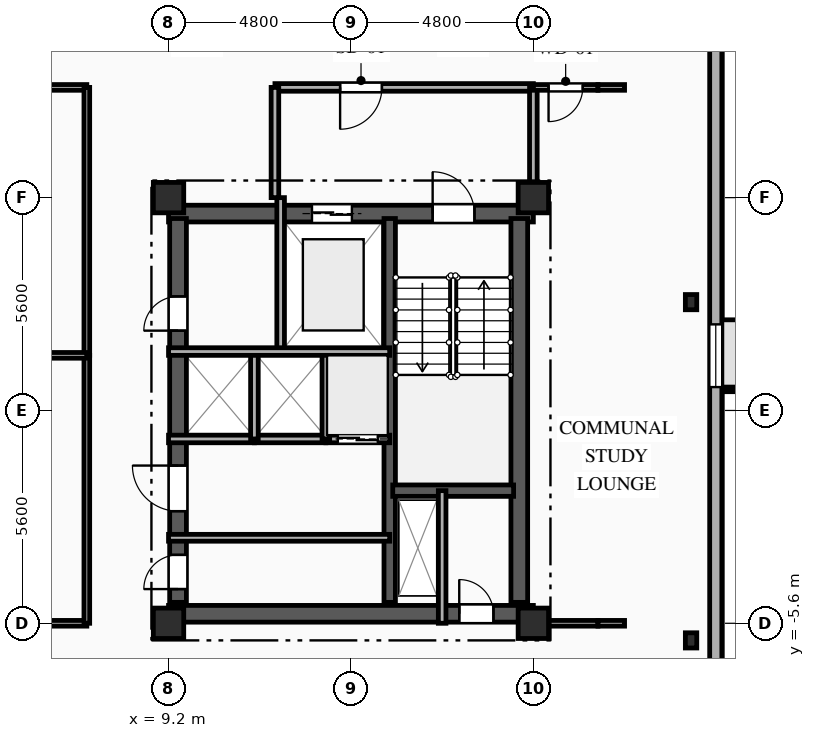
"""IFC4 building model, lengths in metres.
Left out: names, types, materials, properties, quantities, classifications, styles, units other than length and angle.
Written with IfcOpenShell. Run it as: python <this file> out.ifc"""

import sys

from ifc_helpers import new_model, si_unit, direction, frame, frame_2d, origin, origin_2d, place, context, subcontext, project, spatial, rectangle, i_section, extrude, element, fill, save


model = new_model("IFC4")
c1 = context("Model", 3, precision=1e-05, world=origin(), true_north=direction((0.0, 1.0)))
c2 = subcontext(c1, "Body", "Model", "MODEL_VIEW")
j1 = project(units=[si_unit("LENGTHUNIT", "METRE"), si_unit("PLANEANGLEUNIT", "RADIAN")], contexts=[c1])
p1 = place(None, origin())
s1 = spatial("IfcSite", under=j1, at=p1, CompositionType="ELEMENT")
p2 = place(p1, origin())
s2 = spatial("IfcBuilding", under=s1, at=p2, CompositionType="ELEMENT")
p3 = place(p2, frame((0.0, 0.0, 251.75)))
s3 = spatial("IfcBuildingStorey", under=s2, at=p3, CompositionType="ELEMENT", Elevation=251.75)
for number, where, z_axis, x_axis in (
    (1, (9.2, -5.6, 0.0), (0.0, 0.0, 1.0), (1.0, 0.0, 0.0)),
    (2, (9.2, 5.6, 0.0), (0.0, 0.0, 1.0), (1.0, 0.0, 0.0)),
    (3, (18.8, -5.6, 0.0), (0.0, 0.0, 1.0), (1.0, 0.0, 0.0)),
    (4, (18.8, 5.6, 0.0), (0.0, 0.0, 1.0), (1.0, 0.0, 0.0)),
):
    element("IfcColumn", number, at=place(p3, frame(where, z_axis=z_axis, x_axis=x_axis)), inside=s3, PredefinedType="COLUMN", context=c2, shape_type="SweptSolid", body=[
        extrude(rectangle(XDim=0.8, YDim=0.8, at=origin_2d()), origin(), (0.0, 0.0, 1.0), 3.35),
    ])
for number, where, z_axis, x_axis in (
    (5, (22.95, -6.05, 0.0), (0.0, 0.0, 1.0), (1.0, 0.0, 0.0)),
    (6, (22.95, 2.85, 0.0), (0.0, 0.0, 1.0), (1.0, 0.0, 0.0)),
):
    element("IfcColumn", number, at=place(p3, frame(where, z_axis=z_axis, x_axis=x_axis)), inside=s3, PredefinedType="COLUMN", context=c2, shape_type="SweptSolid", body=[
        extrude(i_section(OverallWidth=0.3, OverallDepth=0.4, WebThickness=0.013, FlangeThickness=0.024, FilletRadius=0.027, at=origin_2d()), origin(), (0.0, 0.0, 1.0), 3.35),
    ])
p4 = place(p3, frame((23.6, 12.4, 0.0), z_axis=(0.0, 0.0, 1.0), x_axis=(0.0, -1.0, 0.0)))
e7 = element("IfcWall", 7, at=p4, inside=s3, PredefinedType="SOLIDWALL", context=c2, shape_type="SweptSolid", body=[
    extrude(rectangle(XDim=28.0, YDim=0.32, at=frame_2d((14.0, 0.0))), origin(), (0.0, 0.0, 1.0), 3.04),
])
p5 = place(p4, frame((10.135, 0.0, 0.85)))
e8 = element("IfcOpeningElement", 8, at=p5, cuts=e7, PredefinedType="OPENING", context=c2, shape_type="SweptSolid", body=[
    extrude(rectangle(XDim=1.65, YDim=1.85, at=frame_2d((0.825, 0.925))), frame((0.0, 0.17, 0.0), z_axis=(0.0, -1.0, 0.0), x_axis=(1.0, 0.0, 0.0)), (0.0, 0.0, 1.0), 0.34),
])
p6 = place(p3, frame((9.2, 5.18, 0.0), z_axis=(0.0, 0.0, 1.0), x_axis=(1.0, 0.0, 0.0)))
e9 = element("IfcWall", 9, at=p6, inside=s3, PredefinedType="SHEAR", context=c2, shape_type="SweptSolid", body=[
    extrude(rectangle(XDim=9.6, YDim=0.44, at=frame_2d((4.8, 0.0))), origin(), (0.0, 0.0, 1.0), 3.04),
])
p7 = place(p6, frame((6.95, 0.0, 0.0)))
e10 = element("IfcOpeningElement", 10, at=p7, cuts=e9, PredefinedType="OPENING", context=c2, shape_type="SweptSolid", body=[
    extrude(rectangle(XDim=1.1, YDim=2.15, at=frame_2d((0.55, 1.075))), frame((0.0, 0.23, 0.0), z_axis=(0.0, -1.0, 0.0), x_axis=(1.0, 0.0, 0.0)), (0.0, 0.0, 1.0), 0.46),
])
p8 = place(p6, frame((3.775, 0.0, 0.0)))
e11 = element("IfcOpeningElement", 11, at=p8, cuts=e9, PredefinedType="OPENING", context=c2, shape_type="SweptSolid", body=[
    extrude(rectangle(XDim=1.05, YDim=2.1, at=frame_2d((0.525, 1.05))), frame((0.0, 0.23, 0.0), z_axis=(0.0, -1.0, 0.0), x_axis=(1.0, 0.0, 0.0)), (0.0, 0.0, 1.0), 0.46),
])
p9 = place(p3, frame((9.2, -5.35, 0.0), z_axis=(0.0, 0.0, 1.0), x_axis=(1.0, 0.0, 0.0)))
e12 = element("IfcWall", 12, at=p9, inside=s3, PredefinedType="SHEAR", context=c2, shape_type="SweptSolid", body=[
    extrude(rectangle(XDim=9.6, YDim=0.44, at=frame_2d((4.8, 0.0))), origin(), (0.0, 0.0, 1.0), 3.04),
])
p10 = place(p9, frame((7.65, 0.0, 0.0)))
e13 = element("IfcOpeningElement", 13, at=p10, cuts=e12, PredefinedType="OPENING", context=c2, shape_type="SweptSolid", body=[
    extrude(rectangle(XDim=0.9, YDim=2.1, at=frame_2d((0.45, 1.05))), frame((0.0, 0.23, 0.0), z_axis=(0.0, -1.0, 0.0), x_axis=(1.0, 0.0, 0.0)), (0.0, 0.0, 1.0), 0.46),
])
p11 = place(p3, frame((9.45, -5.05, 0.0), z_axis=(0.0, 0.0, 1.0), x_axis=(0.0, 1.0, 0.0)))
e14 = element("IfcWall", 14, at=p11, inside=s3, PredefinedType="SHEAR", context=c2, shape_type="SweptSolid", body=[
    extrude(rectangle(XDim=10.1, YDim=0.44, at=frame_2d((5.05, 0.0))), origin(), (0.0, 0.0, 1.0), 3.04),
])
p12 = place(p11, frame((7.15, 0.0, 0.0)))
e15 = element("IfcOpeningElement", 15, at=p12, cuts=e14, PredefinedType="OPENING", context=c2, shape_type="SweptSolid", body=[
    extrude(rectangle(XDim=0.9, YDim=2.1, at=frame_2d((0.45, 1.05))), frame((0.0, 0.23, 0.0), z_axis=(0.0, -1.0, 0.0), x_axis=(1.0, 0.0, 0.0)), (0.0, 0.0, 1.0), 0.46),
])
p13 = place(p11, frame((2.4, 0.0, 0.0)))
e16 = element("IfcOpeningElement", 16, at=p13, cuts=e14, PredefinedType="OPENING", context=c2, shape_type="SweptSolid", body=[
    extrude(rectangle(XDim=1.2, YDim=2.15, at=frame_2d((0.6, 1.075))), frame((0.0, 0.23, 0.0), z_axis=(0.0, -1.0, 0.0), x_axis=(1.0, 0.0, 0.0)), (0.0, 0.0, 1.0), 0.46),
])
p14 = place(p11, frame((0.35, 0.0, 0.0)))
e17 = element("IfcOpeningElement", 17, at=p14, cuts=e14, PredefinedType="OPENING", context=c2, shape_type="SweptSolid", body=[
    extrude(rectangle(XDim=0.9, YDim=2.1, at=frame_2d((0.45, 1.05))), frame((0.0, 0.23, 0.0), z_axis=(0.0, -1.0, 0.0), x_axis=(1.0, 0.0, 0.0)), (0.0, 0.0, 1.0), 0.46),
])
p15 = place(p3, frame((18.43, -5.05, 0.0), z_axis=(0.0, 0.0, 1.0), x_axis=(0.0, 1.0, 0.0)))
e18 = element("IfcWall", 18, at=p15, inside=s3, PredefinedType="SHEAR", context=c2, shape_type="SweptSolid", body=[
    extrude(rectangle(XDim=10.1, YDim=0.44, at=frame_2d((5.05, 0.0))), origin(), (0.0, 0.0, 1.0), 3.04),
])
p16 = place(p3, frame((15.02, -5.05, 0.0), z_axis=(0.0, 0.0, 1.0), x_axis=(0.0, 1.0, 0.0)))
e19 = element("IfcWall", 19, at=p16, inside=s3, PredefinedType="SHEAR", context=c2, shape_type="SweptSolid", body=[
    extrude(rectangle(XDim=10.1, YDim=0.3, at=frame_2d((5.05, 0.0))), origin(), (0.0, 0.0, 1.0), 3.04),
])
p17 = place(p3, frame((15.1, -2.11, 0.0), z_axis=(0.0, 0.0, 1.0), x_axis=(1.0, 0.0, 0.0)))
e20 = element("IfcWall", 20, at=p17, inside=s3, PredefinedType="SHEAR", context=c2, shape_type="SweptSolid", body=[
    extrude(rectangle(XDim=3.18, YDim=0.3, at=frame_2d((1.59, 0.0))), origin(), (0.0, 0.0, 1.0), 3.04),
])
p18 = place(p3, frame((16.4, -2.11, 0.0), z_axis=(0.0, 0.0, 1.0), x_axis=(0.0, -1.0, 0.0)))
e21 = element("IfcWall", 21, at=p18, inside=s3, PredefinedType="PARTITIONING", context=c2, shape_type="SweptSolid", body=[
    extrude(rectangle(XDim=3.49, YDim=0.2, at=frame_2d((1.745, 0.0))), origin(), (0.0, 0.0, 1.0), 3.04),
])
p19 = place(p3, frame((12.15, 5.6, 0.0), z_axis=(0.0, 0.0, 1.0), x_axis=(0.0, -1.0, 0.0)))
e22 = element("IfcWall", 22, at=p19, inside=s3, PredefinedType="PARTITIONING", context=c2, shape_type="SweptSolid", body=[
    extrude(rectangle(XDim=4.05, YDim=0.2, at=frame_2d((2.025, 0.0))), origin(), (0.0, 0.0, 1.0), 3.04),
])
p20 = place(p3, frame((18.8, 8.5, 0.0), z_axis=(0.0, 0.0, 1.0), x_axis=(-1.0, 0.0, 0.0)))
e23 = element("IfcWall", 23, at=p20, inside=s3, PredefinedType="PARTITIONING", context=c2, shape_type="SweptSolid", body=[
    extrude(rectangle(XDim=6.8, YDim=0.2, at=frame_2d((3.4, 0.0))), origin(), (0.0, 0.0, 1.0), 3.04),
])
p21 = place(p20, frame((3.985, 0.0, 0.0)))
e24 = element("IfcOpeningElement", 24, at=p21, cuts=e23, PredefinedType="OPENING", context=c2, shape_type="SweptSolid", body=[
    extrude(rectangle(XDim=1.1, YDim=2.15, at=frame_2d((0.55, 1.075))), frame((0.0, 0.11, 0.0), z_axis=(0.0, -1.0, 0.0), x_axis=(1.0, 0.0, 0.0)), (0.0, 0.0, 1.0), 0.22),
])
p22 = place(p3, frame((12.0, 8.5, 0.0), z_axis=(0.0, 0.0, 1.0), x_axis=(0.0, -1.0, 0.0)))
e25 = element("IfcWall", 25, at=p22, inside=s3, PredefinedType="PARTITIONING", context=c2, shape_type="SweptSolid", body=[
    extrude(rectangle(XDim=2.9, YDim=0.2, at=frame_2d((1.45, 0.0))), origin(), (0.0, 0.0, 1.0), 3.04),
])
p23 = place(p3, frame((18.8, 5.6, 0.0), z_axis=(0.0, 0.0, 1.0), x_axis=(0.0, 1.0, 0.0)))
e26 = element("IfcWall", 26, at=p23, inside=s3, PredefinedType="PARTITIONING", context=c2, shape_type="SweptSolid", body=[
    extrude(rectangle(XDim=2.9, YDim=0.2, at=frame_2d((1.45, 0.0))), origin(), (0.0, 0.0, 1.0), 2.665),
])
p24 = place(p3, frame((9.2, -3.35, 0.0), z_axis=(0.0, 0.0, 1.0), x_axis=(1.0, 0.0, 0.0)))
e27 = element("IfcWall", 27, at=p24, inside=s3, PredefinedType="PARTITIONING", context=c2, shape_type="SweptSolid", body=[
    extrude(rectangle(XDim=5.82, YDim=0.18, at=frame_2d((2.91, 0.0))), origin(), (0.0, 0.0, 1.0), 2.755),
])
p25 = place(p3, frame((11.46, -0.75, 0.0), z_axis=(0.0, 0.0, 1.0), x_axis=(-1.0, 0.0, 0.0)))
e28 = element("IfcWall", 28, at=p25, inside=s3, PredefinedType="PARTITIONING", context=c2, shape_type="SweptSolid", body=[
    extrude(rectangle(XDim=2.26, YDim=0.2, at=frame_2d((1.13, 0.0))), origin(), (0.0, 0.0, 1.0), 3.04),
])
p26 = place(p3, frame((13.34, -0.75, 0.0), z_axis=(0.0, 0.0, 1.0), x_axis=(-1.0, 0.0, 0.0)))
e29 = element("IfcWall", 29, at=p26, inside=s3, PredefinedType="PARTITIONING", context=c2, shape_type="SweptSolid", body=[
    extrude(rectangle(XDim=1.88, YDim=0.2, at=frame_2d((0.94, 0.0))), origin(), (0.0, 0.0, 1.0), 3.04),
])
p27 = place(p3, frame((15.02, -0.75, 0.0), z_axis=(0.0, 0.0, 1.0), x_axis=(-1.0, 0.0, 0.0)))
e30 = element("IfcWall", 30, at=p27, inside=s3, PredefinedType="PARTITIONING", context=c2, shape_type="SweptSolid", body=[
    extrude(rectangle(XDim=1.68, YDim=0.2, at=frame_2d((0.84, 0.0))), origin(), (0.0, 0.0, 1.0), 3.04),
])
p28 = place(p27, frame((0.315, 0.0, 0.0)))
e31 = element("IfcOpeningElement", 31, at=p28, cuts=e30, PredefinedType="OPENING", context=c2, shape_type="SweptSolid", body=[
    extrude(rectangle(XDim=1.05, YDim=2.1, at=frame_2d((0.525, 1.05))), frame((0.0, 0.11, 0.0), z_axis=(0.0, -1.0, 0.0), x_axis=(1.0, 0.0, 0.0)), (0.0, 0.0, 1.0), 0.22),
])
for number, where, z_axis, x_axis in (
    (32, (11.46, -0.75, 0.0), (0.0, 0.0, 1.0), (0.0, 1.0, 0.0)),
    (33, (13.34, -0.75, 0.0), (0.0, 0.0, 1.0), (0.0, 1.0, 0.0)),
):
    element("IfcWall", number, at=place(p3, frame(where, z_axis=z_axis, x_axis=x_axis)), inside=s3, PredefinedType="PARTITIONING", context=c2, shape_type="SweptSolid", body=[
        extrude(rectangle(XDim=2.3, YDim=0.2, at=frame_2d((1.15, 0.0))), origin(), (0.0, 0.0, 1.0), 3.04),
    ])
p29 = place(p3, frame((20.5, 8.5, 0.0), z_axis=(0.0, 0.0, 1.0), x_axis=(-1.0, 0.0, 0.0)))
e34 = element("IfcWall", 34, at=p29, inside=s3, PredefinedType="PARTITIONING", context=c2, shape_type="SweptSolid", body=[
    extrude(rectangle(XDim=1.7, YDim=0.15, at=frame_2d((0.85, 0.0))), origin(), (0.0, 0.0, 1.0), 3.04),
])
p30 = place(p29, frame((0.4, 0.0, 0.0)))
e35 = element("IfcOpeningElement", 35, at=p30, cuts=e34, PredefinedType="OPENING", context=c2, shape_type="SweptSolid", body=[
    extrude(rectangle(XDim=0.9, YDim=2.1, at=frame_2d((0.45, 1.05))), frame((0.0, 0.085, 0.0), z_axis=(0.0, -1.0, 0.0), x_axis=(1.0, 0.0, 0.0)), (0.0, 0.0, 1.0), 0.17),
])
p31 = place(p3, frame((21.2, 8.5, 0.0), z_axis=(0.0, 0.0, 1.0), x_axis=(-1.0, 0.0, 0.0)))
e36 = element("IfcWall", 36, at=p31, inside=s3, PredefinedType="PARTITIONING", context=c2, shape_type="SweptSolid", body=[
    extrude(rectangle(XDim=0.7, YDim=0.15, at=frame_2d((0.35, 0.0))), origin(), (0.0, 0.0, 1.0), 3.04),
])
p32 = place(p3, frame((7.05, 8.5, 0.0), z_axis=(0.0, 0.0, 1.0), x_axis=(-1.0, 0.0, 0.0)))
e37 = element("IfcWall", 37, at=p32, inside=s3, PredefinedType="PARTITIONING", context=c2, shape_type="SweptSolid", body=[
    extrude(rectangle(XDim=7.05, YDim=0.15, at=frame_2d((3.525, 0.0))), origin(), (0.0, 0.0, 1.0), 3.04),
])
p33 = place(p3, frame((18.8, -5.6, 0.0), z_axis=(0.0, 0.0, 1.0), x_axis=(1.0, 0.0, 0.0)))
e38 = element("IfcWall", 38, at=p33, inside=s3, PredefinedType="PARTITIONING", context=c2, shape_type="SweptSolid", body=[
    extrude(rectangle(XDim=1.7, YDim=0.15, at=frame_2d((0.85, 0.0))), origin(), (0.0, 0.0, 1.0), 3.04),
])
p34 = place(p3, frame((20.5, -5.6, 0.0), z_axis=(0.0, 0.0, 1.0), x_axis=(1.0, 0.0, 0.0)))
e39 = element("IfcWall", 39, at=p34, inside=s3, PredefinedType="PARTITIONING", context=c2, shape_type="SweptSolid", body=[
    extrude(rectangle(XDim=0.7, YDim=0.15, at=frame_2d((0.35, 0.0))), origin(), (0.0, 0.0, 1.0), 3.04),
])
p35 = place(p3, frame((0.0, -5.6, 0.0), z_axis=(0.0, 0.0, 1.0), x_axis=(1.0, 0.0, 0.0)))
e40 = element("IfcWall", 40, at=p35, inside=s3, PredefinedType="PARTITIONING", context=c2, shape_type="SweptSolid", body=[
    extrude(rectangle(XDim=7.05, YDim=0.15, at=frame_2d((3.525, 0.0))), origin(), (0.0, 0.0, 1.0), 2.525),
])
for number, where, z_axis, x_axis in (
    (41, (7.05, -5.6, 0.0), (0.0, 0.0, 1.0), (0.0, 1.0, 0.0)),
    (42, (7.05, 1.45, 0.0), (0.0, 0.0, 1.0), (0.0, 1.0, 0.0)),
):
    element("IfcWall", number, at=place(p3, frame(where, z_axis=z_axis, x_axis=x_axis)), inside=s3, PredefinedType="PARTITIONING", context=c2, shape_type="SweptSolid", body=[
        extrude(rectangle(XDim=7.05, YDim=0.15, at=frame_2d((3.525, 0.0))), origin(), (0.0, 0.0, 1.0), 3.04),
    ])
p36 = place(p3, frame((-7.05, 1.45, 0.0), z_axis=(0.0, 0.0, 1.0), x_axis=(1.0, 0.0, 0.0)))
e43 = element("IfcWall", 43, at=p36, inside=s3, PredefinedType="PARTITIONING", context=c2, shape_type="SweptSolid", body=[
    extrude(rectangle(XDim=14.1, YDim=0.15, at=frame_2d((7.05, 0.0))), origin(), (0.0, 0.0, 1.0), 3.04),
])
p37 = place(p3, frame((9.2, 1.55, 0.0), z_axis=(0.0, 0.0, 1.0), x_axis=(1.0, 0.0, 0.0)))
e44 = element("IfcWall", 44, at=p37, inside=s3, PredefinedType="PARTITIONING", context=c2, shape_type="SweptSolid", body=[
    extrude(rectangle(XDim=5.82, YDim=0.2, at=frame_2d((2.91, 0.0))), origin(), (0.0, 0.0, 1.0), 3.04),
])
p38 = place(p5, origin())
e45 = element("IfcWindow", 45, at=p38, inside=s3, PartitioningType="SINGLE_PANEL", PredefinedType="WINDOW", context=c2, shape_type="SweptSolid", body=[
    extrude(rectangle(XDim=1.65, YDim=1.85, at=frame_2d((0.825, 0.925))), frame((0.0, 0.03, 0.0), z_axis=(0.0, -1.0, 0.0), x_axis=(1.0, 0.0, 0.0)), (0.0, 0.0, 1.0), 0.06),
])
fill(e8, e45)
p39 = place(p7, origin())
e46 = element("IfcDoor", 46, at=p39, inside=s3, OperationType="SINGLE_SWING_LEFT", PredefinedType="DOOR", context=c2, shape_type="SweptSolid", body=[
    extrude(rectangle(XDim=1.1, YDim=2.15, at=frame_2d((0.55, 1.075))), frame((0.0, 0.025, 0.0), z_axis=(0.0, -1.0, 0.0), x_axis=(1.0, 0.0, 0.0)), (0.0, 0.0, 1.0), 0.05),
])
fill(e10, e46)
p40 = place(p8, origin())
e47 = element("IfcDoor", 47, at=p40, inside=s3, OperationType="DOUBLE_DOOR_SLIDING", PredefinedType="DOOR", context=c2, shape_type="SweptSolid", body=[
    extrude(rectangle(XDim=1.05, YDim=2.1, at=frame_2d((0.525, 1.05))), frame((0.0, 0.025, 0.0), z_axis=(0.0, -1.0, 0.0), x_axis=(1.0, 0.0, 0.0)), (0.0, 0.0, 1.0), 0.05),
])
fill(e11, e47)
p41 = place(p10, origin())
e48 = element("IfcDoor", 48, at=p41, inside=s3, OperationType="SINGLE_SWING_LEFT", PredefinedType="DOOR", context=c2, shape_type="SweptSolid", body=[
    extrude(rectangle(XDim=0.9, YDim=2.1, at=frame_2d((0.45, 1.05))), frame((0.0, 0.025, 0.0), z_axis=(0.0, -1.0, 0.0), x_axis=(1.0, 0.0, 0.0)), (0.0, 0.0, 1.0), 0.05),
])
fill(e13, e48)
p42 = place(p21, origin())
e49 = element("IfcDoor", 49, at=p42, inside=s3, OperationType="SINGLE_SWING_RIGHT", PredefinedType="DOOR", context=c2, shape_type="SweptSolid", body=[
    extrude(rectangle(XDim=1.1, YDim=2.15, at=frame_2d((0.55, 1.075))), frame((0.0, 0.025, 0.0), z_axis=(0.0, -1.0, 0.0), x_axis=(1.0, 0.0, 0.0)), (0.0, 0.0, 1.0), 0.05),
])
fill(e24, e49)
p43 = place(p12, origin())
e50 = element("IfcDoor", 50, at=p43, inside=s3, OperationType="SINGLE_SWING_LEFT", PredefinedType="DOOR", context=c2, shape_type="SweptSolid", body=[
    extrude(rectangle(XDim=0.9, YDim=2.1, at=frame_2d((0.45, 1.05))), frame((0.0, 0.025, 0.0), z_axis=(0.0, -1.0, 0.0), x_axis=(1.0, 0.0, 0.0)), (0.0, 0.0, 1.0), 0.05),
])
fill(e15, e50)
p44 = place(p28, origin())
e51 = element("IfcDoor", 51, at=p44, inside=s3, OperationType="DOUBLE_DOOR_SLIDING", PredefinedType="DOOR", context=c2, shape_type="SweptSolid", body=[
    extrude(rectangle(XDim=1.05, YDim=2.1, at=frame_2d((0.525, 1.05))), frame((0.0, 0.025, 0.0), z_axis=(0.0, -1.0, 0.0), x_axis=(1.0, 0.0, 0.0)), (0.0, 0.0, 1.0), 0.05),
])
fill(e31, e51)
p45 = place(p13, origin())
e52 = element("IfcDoor", 52, at=p45, inside=s3, OperationType="SINGLE_SWING_RIGHT", PredefinedType="DOOR", context=c2, shape_type="SweptSolid", body=[
    extrude(rectangle(XDim=1.2, YDim=2.15, at=frame_2d((0.6, 1.075))), frame((0.0, 0.025, 0.0), z_axis=(0.0, -1.0, 0.0), x_axis=(1.0, 0.0, 0.0)), (0.0, 0.0, 1.0), 0.05),
])
fill(e16, e52)
p46 = place(p14, origin())
e53 = element("IfcDoor", 53, at=p46, inside=s3, OperationType="SINGLE_SWING_LEFT", PredefinedType="DOOR", context=c2, shape_type="SweptSolid", body=[
    extrude(rectangle(XDim=0.9, YDim=2.1, at=frame_2d((0.45, 1.05))), frame((0.0, 0.025, 0.0), z_axis=(0.0, -1.0, 0.0), x_axis=(1.0, 0.0, 0.0)), (0.0, 0.0, 1.0), 0.05),
])
fill(e17, e53)
p47 = place(p30, origin())
e54 = element("IfcDoor", 54, at=p47, inside=s3, OperationType="SINGLE_SWING_RIGHT", PredefinedType="DOOR", context=c2, shape_type="SweptSolid", body=[
    extrude(rectangle(XDim=0.9, YDim=2.1, at=frame_2d((0.45, 1.05))), frame((0.0, 0.025, 0.0), z_axis=(0.0, -1.0, 0.0), x_axis=(1.0, 0.0, 0.0)), (0.0, 0.0, 1.0), 0.05),
])
fill(e35, e54)
save(model, sys.argv[1])
